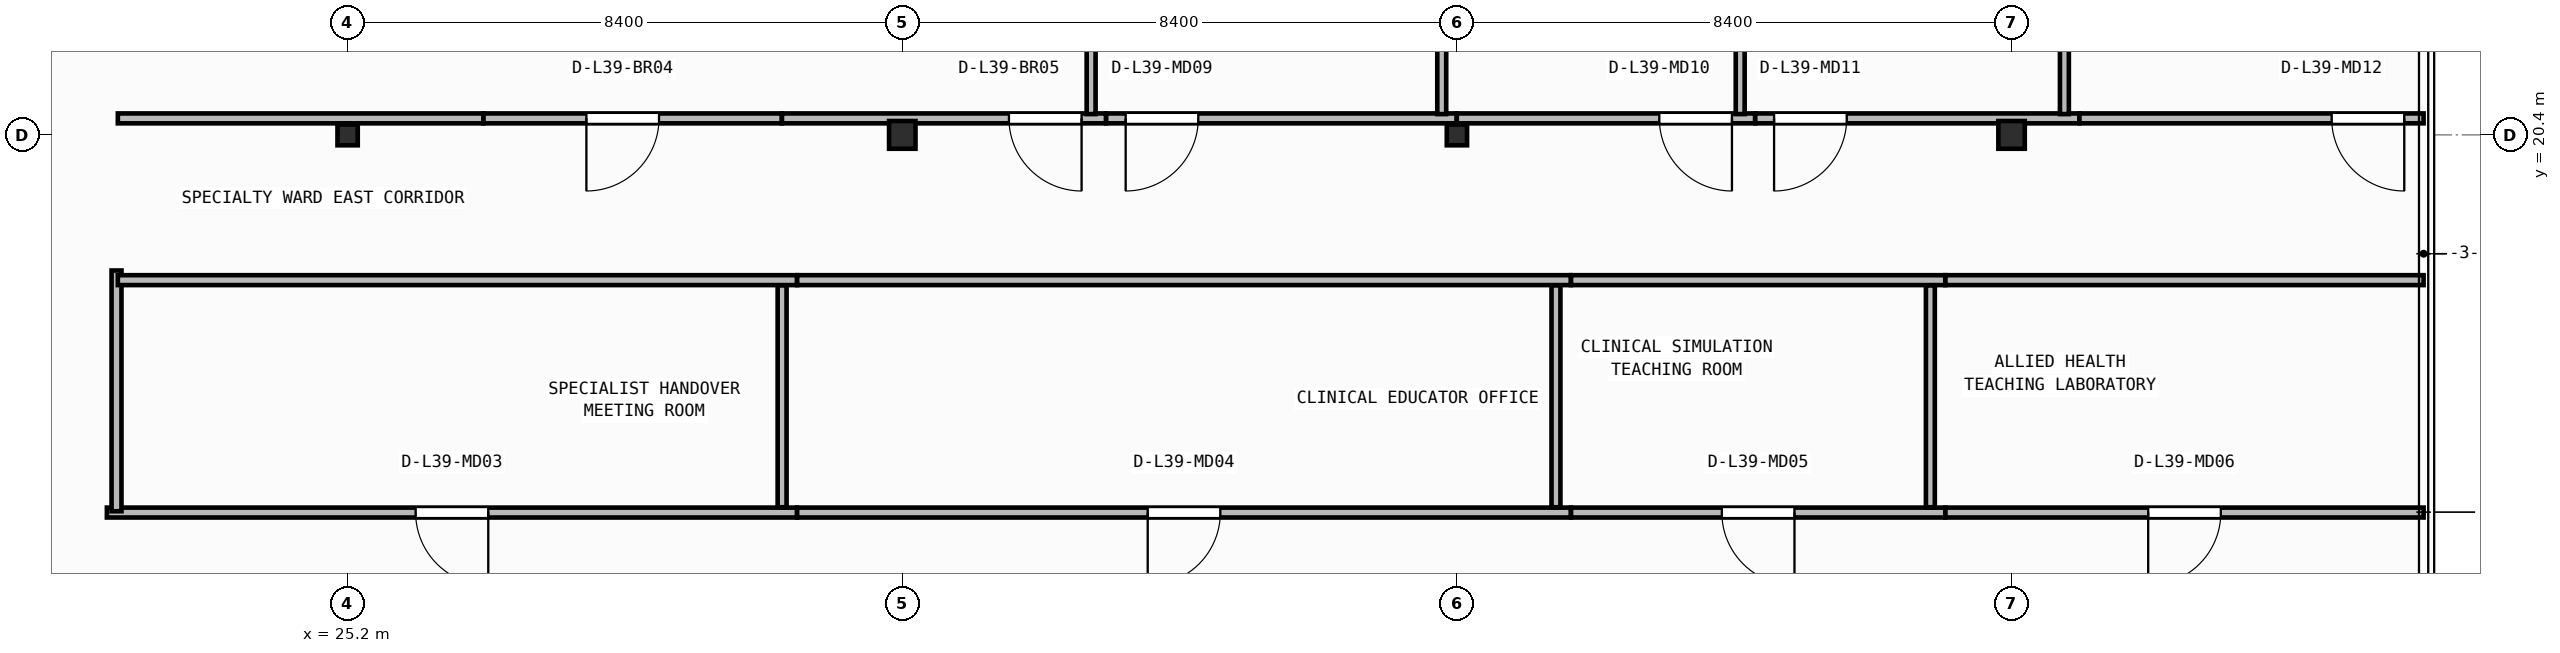
"""IFC4 building model, lengths in metres.
Left out: names, types, materials, properties, quantities, classifications, styles, units other than length and angle.
Written with IfcOpenShell. Run it as: python <this file> out.ifc"""

import sys

from ifc_helpers import new_model, si_unit, direction, frame, frame_2d, origin, origin_2d, place, context, subcontext, project, spatial, rectangle, i_section, extrude, element, fill, save


model = new_model("IFC4")
c1 = context("Model", 3, precision=1e-05, world=origin(), true_north=direction((0.0, 1.0)))
c2 = subcontext(c1, "Body", "Model", "MODEL_VIEW")
j1 = project(units=[si_unit("LENGTHUNIT", "METRE"), si_unit("PLANEANGLEUNIT", "RADIAN")], contexts=[c1])
p1 = place(None, origin())
s1 = spatial("IfcSite", under=j1, at=p1, CompositionType="ELEMENT")
p2 = place(p1, origin())
s2 = spatial("IfcBuilding", under=s1, at=p2, CompositionType="ELEMENT")
p3 = place(p2, frame((0.0, 0.0, 158.65)))
s3 = spatial("IfcBuildingStorey", under=s2, at=p3, CompositionType="ELEMENT", Elevation=158.65)
p4 = place(p3, frame((25.2, 20.4, 0.0), z_axis=(0.0, 0.0, 1.0), x_axis=(1.0, 0.0, 0.0)))
e1 = element("IfcColumn", 1, at=p4, inside=s3, PredefinedType="COLUMN", context=c2, shape_type="SweptSolid", body=[
    extrude(i_section(OverallWidth=0.307, OverallDepth=0.315, WebThickness=0.012, FlangeThickness=0.019, FilletRadius=0.017, at=origin_2d()), origin(), (0.0, 0.0, 1.0), 3.95),
])
p5 = place(p3, frame((33.6, 20.4, 0.0), z_axis=(0.0, 0.0, 1.0), x_axis=(1.0, 0.0, 0.0)))
e2 = element("IfcColumn", 2, at=p5, inside=s3, PredefinedType="COLUMN", context=c2, shape_type="SweptSolid", body=[
    extrude(i_section(OverallWidth=0.4, OverallDepth=0.42, WebThickness=0.025, FlangeThickness=0.04, at=origin_2d()), origin(), (0.0, 0.0, 1.0), 3.95),
])
p6 = place(p3, frame((42.0, 20.4, 0.0), z_axis=(0.0, 0.0, 1.0), x_axis=(1.0, 0.0, 0.0)))
e3 = element("IfcColumn", 3, at=p6, inside=s3, PredefinedType="COLUMN", context=c2, shape_type="SweptSolid", body=[
    extrude(i_section(OverallWidth=0.307, OverallDepth=0.315, WebThickness=0.012, FlangeThickness=0.019, FilletRadius=0.017, at=origin_2d()), origin(), (0.0, 0.0, 1.0), 3.95),
])
p7 = place(p3, frame((50.4, 20.4, 0.0), z_axis=(0.0, 0.0, 1.0), x_axis=(1.0, 0.0, 0.0)))
e4 = element("IfcColumn", 4, at=p7, inside=s3, PredefinedType="COLUMN", context=c2, shape_type="SweptSolid", body=[
    extrude(i_section(OverallWidth=0.4, OverallDepth=0.42, WebThickness=0.025, FlangeThickness=0.04, at=origin_2d()), origin(), (0.0, 0.0, 1.0), 3.95),
])
p8 = place(p3, frame((32.006, 14.68, 0.0), z_axis=(0.0, 0.0, 1.0), x_axis=(-1.0, 0.0, 0.0)))
e5 = element("IfcWall", 5, at=p8, inside=s3, PredefinedType="PARTITIONING", context=c2, shape_type="SweptSolid", body=[
    extrude(rectangle(XDim=10.452, YDim=0.15, at=frame_2d((5.226, 0.0))), origin(), (0.0, 0.0, 1.0), 3.71),
])
p9 = place(p8, frame((4.676, 0.0, 0.0)))
e6 = element("IfcOpeningElement", 6, at=p9, cuts=e5, PredefinedType="OPENING", context=c2, shape_type="SweptSolid", body=[
    extrude(rectangle(XDim=1.1, YDim=2.1, at=frame_2d((0.55, 1.05))), frame((0.0, 0.085, 0.0), z_axis=(0.0, -1.0, 0.0), x_axis=(1.0, 0.0, 0.0)), (0.0, 0.0, 1.0), 0.17),
])
p10 = place(p3, frame((43.726, 14.68, 0.0), z_axis=(0.0, 0.0, 1.0), x_axis=(-1.0, 0.0, 0.0)))
e7 = element("IfcWall", 7, at=p10, inside=s3, PredefinedType="PARTITIONING", context=c2, shape_type="SweptSolid", body=[
    extrude(rectangle(XDim=11.718, YDim=0.15, at=frame_2d((5.859, 0.0))), origin(), (0.0, 0.0, 1.0), 3.71),
])
p11 = place(p10, frame((5.309, 0.0, 0.0)))
e8 = element("IfcOpeningElement", 8, at=p11, cuts=e7, PredefinedType="OPENING", context=c2, shape_type="SweptSolid", body=[
    extrude(rectangle(XDim=1.1, YDim=2.1, at=frame_2d((0.55, 1.05))), frame((0.0, 0.085, 0.0), z_axis=(0.0, -1.0, 0.0), x_axis=(1.0, 0.0, 0.0)), (0.0, 0.0, 1.0), 0.17),
])
p12 = place(p3, frame((49.396, 14.68, 0.0), z_axis=(0.0, 0.0, 1.0), x_axis=(-1.0, 0.0, 0.0)))
e9 = element("IfcWall", 9, at=p12, inside=s3, PredefinedType="PARTITIONING", context=c2, shape_type="SweptSolid", body=[
    extrude(rectangle(XDim=5.668, YDim=0.15, at=frame_2d((2.834, 0.0))), origin(), (0.0, 0.0, 1.0), 3.71),
])
p13 = place(p12, frame((2.284, 0.0, 0.0)))
e10 = element("IfcOpeningElement", 10, at=p13, cuts=e9, PredefinedType="OPENING", context=c2, shape_type="SweptSolid", body=[
    extrude(rectangle(XDim=1.1, YDim=2.1, at=frame_2d((0.55, 1.05))), frame((0.0, 0.085, 0.0), z_axis=(0.0, -1.0, 0.0), x_axis=(1.0, 0.0, 0.0)), (0.0, 0.0, 1.0), 0.17),
])
p14 = place(p3, frame((56.64, 14.68, 0.0), z_axis=(0.0, 0.0, 1.0), x_axis=(-1.0, 0.0, 0.0)))
e11 = element("IfcWall", 11, at=p14, inside=s3, PredefinedType="PARTITIONING", context=c2, shape_type="SweptSolid", body=[
    extrude(rectangle(XDim=7.242, YDim=0.15, at=frame_2d((3.621, 0.0))), origin(), (0.0, 0.0, 1.0), 3.71),
])
p15 = place(p14, frame((3.071, 0.0, 0.0)))
e12 = element("IfcOpeningElement", 12, at=p15, cuts=e11, PredefinedType="OPENING", context=c2, shape_type="SweptSolid", body=[
    extrude(rectangle(XDim=1.1, YDim=2.1, at=frame_2d((0.55, 1.05))), frame((0.0, 0.085, 0.0), z_axis=(0.0, -1.0, 0.0), x_axis=(1.0, 0.0, 0.0)), (0.0, 0.0, 1.0), 0.17),
])
p16 = place(p3, frame((21.7, 14.7, 0.0), z_axis=(0.0, 0.0, 1.0), x_axis=(0.0, 1.0, 0.0)))
e13 = element("IfcWall", 13, at=p16, inside=s3, PredefinedType="PARTITIONING", context=c2, shape_type="SweptSolid", body=[
    extrude(rectangle(XDim=3.646, YDim=0.15, at=frame_2d((1.823, 0.0))), origin(), (0.0, 0.0, 1.0), 3.71),
])
p17 = place(p3, frame((21.72, 18.2, 0.0), z_axis=(0.0, 0.0, 1.0), x_axis=(1.0, 0.0, 0.0)))
e14 = element("IfcWall", 14, at=p17, inside=s3, PredefinedType="PARTITIONING", context=c2, shape_type="SweptSolid", body=[
    extrude(rectangle(XDim=10.286, YDim=0.15, at=frame_2d((5.143, 0.0))), origin(), (0.0, 0.0, 1.0), 3.71),
])
p18 = place(p3, frame((32.008, 18.2, 0.0), z_axis=(0.0, 0.0, 1.0), x_axis=(1.0, 0.0, 0.0)))
e15 = element("IfcWall", 15, at=p18, inside=s3, PredefinedType="PARTITIONING", context=c2, shape_type="SweptSolid", body=[
    extrude(rectangle(XDim=11.718, YDim=0.15, at=frame_2d((5.859, 0.0))), origin(), (0.0, 0.0, 1.0), 3.71),
])
p19 = place(p3, frame((43.728, 18.2, 0.0), z_axis=(0.0, 0.0, 1.0), x_axis=(1.0, 0.0, 0.0)))
e16 = element("IfcWall", 16, at=p19, inside=s3, PredefinedType="PARTITIONING", context=c2, shape_type="SweptSolid", body=[
    extrude(rectangle(XDim=5.668, YDim=0.15, at=frame_2d((2.834, 0.0))), origin(), (0.0, 0.0, 1.0), 3.71),
])
p20 = place(p3, frame((49.398, 18.2, 0.0), z_axis=(0.0, 0.0, 1.0), x_axis=(1.0, 0.0, 0.0)))
e17 = element("IfcWall", 17, at=p20, inside=s3, PredefinedType="PARTITIONING", context=c2, shape_type="SweptSolid", body=[
    extrude(rectangle(XDim=7.242, YDim=0.15, at=frame_2d((3.621, 0.0))), origin(), (0.0, 0.0, 1.0), 3.71),
])
p21 = place(p3, frame((27.256, 20.65, 0.0), z_axis=(0.0, 0.0, 1.0), x_axis=(-1.0, 0.0, 0.0)))
e18 = element("IfcWall", 18, at=p21, inside=s3, PredefinedType="PARTITIONING", context=c2, shape_type="SweptSolid", body=[
    extrude(rectangle(XDim=5.536, YDim=0.15, at=frame_2d((2.768, 0.0))), origin(), (0.0, 0.0, 1.0), 3.083),
])
p22 = place(p3, frame((31.776, 20.65, 0.0), z_axis=(0.0, 0.0, 1.0), x_axis=(-1.0, 0.0, 0.0)))
e19 = element("IfcWall", 19, at=p22, inside=s3, PredefinedType="PARTITIONING", context=c2, shape_type="SweptSolid", body=[
    extrude(rectangle(XDim=4.518, YDim=0.15, at=frame_2d((2.259, 0.0))), origin(), (0.0, 0.0, 1.0), 3.083),
])
p23 = place(p22, frame((1.86, 0.0, 0.0)))
e20 = element("IfcOpeningElement", 20, at=p23, cuts=e19, PredefinedType="OPENING", context=c2, shape_type="SweptSolid", body=[
    extrude(rectangle(XDim=1.1, YDim=2.1, at=frame_2d((0.55, 1.05))), frame((0.0, 0.085, 0.0), z_axis=(0.0, -1.0, 0.0), x_axis=(1.0, 0.0, 0.0)), (0.0, 0.0, 1.0), 0.17),
])
p24 = place(p3, frame((36.686, 20.65, 0.0), z_axis=(0.0, 0.0, 1.0), x_axis=(-1.0, 0.0, 0.0)))
e21 = element("IfcWall", 21, at=p24, inside=s3, PredefinedType="PARTITIONING", context=c2, shape_type="SweptSolid", body=[
    extrude(rectangle(XDim=4.908, YDim=0.15, at=frame_2d((2.454, 0.0))), origin(), (0.0, 0.0, 1.0), 3.083),
])
p25 = place(p24, frame((0.37, 0.0, 0.0)))
e22 = element("IfcOpeningElement", 22, at=p25, cuts=e21, PredefinedType="OPENING", context=c2, shape_type="SweptSolid", body=[
    extrude(rectangle(XDim=1.1, YDim=2.1, at=frame_2d((0.55, 1.05))), frame((0.0, 0.085, 0.0), z_axis=(0.0, -1.0, 0.0), x_axis=(1.0, 0.0, 0.0)), (0.0, 0.0, 1.0), 0.17),
])
p26 = place(p3, frame((41.996, 20.65, 0.0), z_axis=(0.0, 0.0, 1.0), x_axis=(-1.0, 0.0, 0.0)))
e23 = element("IfcWall", 23, at=p26, inside=s3, PredefinedType="PARTITIONING", context=c2, shape_type="SweptSolid", body=[
    extrude(rectangle(XDim=5.308, YDim=0.15, at=frame_2d((2.654, 0.0))), origin(), (0.0, 0.0, 1.0), 3.083),
])
p27 = place(p26, frame((3.913, 0.0, 0.0)))
e24 = element("IfcOpeningElement", 24, at=p27, cuts=e23, PredefinedType="OPENING", context=c2, shape_type="SweptSolid", body=[
    extrude(rectangle(XDim=1.1, YDim=2.1, at=frame_2d((0.55, 1.05))), frame((0.0, 0.085, 0.0), z_axis=(0.0, -1.0, 0.0), x_axis=(1.0, 0.0, 0.0)), (0.0, 0.0, 1.0), 0.17),
])
p28 = place(p3, frame((46.516, 20.65, 0.0), z_axis=(0.0, 0.0, 1.0), x_axis=(-1.0, 0.0, 0.0)))
e25 = element("IfcWall", 25, at=p28, inside=s3, PredefinedType="PARTITIONING", context=c2, shape_type="SweptSolid", body=[
    extrude(rectangle(XDim=4.518, YDim=0.15, at=frame_2d((2.259, 0.0))), origin(), (0.0, 0.0, 1.0), 3.083),
])
p29 = place(p28, frame((0.351, 0.0, 0.0)))
e26 = element("IfcOpeningElement", 26, at=p29, cuts=e25, PredefinedType="OPENING", context=c2, shape_type="SweptSolid", body=[
    extrude(rectangle(XDim=1.1, YDim=2.1, at=frame_2d((0.55, 1.05))), frame((0.0, 0.085, 0.0), z_axis=(0.0, -1.0, 0.0), x_axis=(1.0, 0.0, 0.0)), (0.0, 0.0, 1.0), 0.17),
])
p30 = place(p3, frame((51.426, 20.65, 0.0), z_axis=(0.0, 0.0, 1.0), x_axis=(-1.0, 0.0, 0.0)))
e27 = element("IfcWall", 27, at=p30, inside=s3, PredefinedType="PARTITIONING", context=c2, shape_type="SweptSolid", body=[
    extrude(rectangle(XDim=4.908, YDim=0.15, at=frame_2d((2.454, 0.0))), origin(), (0.0, 0.0, 1.0), 3.083),
])
p31 = place(p30, frame((3.523, 0.0, 0.0)))
e28 = element("IfcOpeningElement", 28, at=p31, cuts=e27, PredefinedType="OPENING", context=c2, shape_type="SweptSolid", body=[
    extrude(rectangle(XDim=1.1, YDim=2.1, at=frame_2d((0.55, 1.05))), frame((0.0, 0.085, 0.0), z_axis=(0.0, -1.0, 0.0), x_axis=(1.0, 0.0, 0.0)), (0.0, 0.0, 1.0), 0.17),
])
p32 = place(p3, frame((56.64, 20.65, 0.0), z_axis=(0.0, 0.0, 1.0), x_axis=(-1.0, 0.0, 0.0)))
e29 = element("IfcWall", 29, at=p32, inside=s3, PredefinedType="PARTITIONING", context=c2, shape_type="SweptSolid", body=[
    extrude(rectangle(XDim=5.212, YDim=0.15, at=frame_2d((2.606, 0.0))), origin(), (0.0, 0.0, 1.0), 3.71),
])
p33 = place(p32, frame((0.293, 0.0, 0.0)))
e30 = element("IfcOpeningElement", 30, at=p33, cuts=e29, PredefinedType="OPENING", context=c2, shape_type="SweptSolid", body=[
    extrude(rectangle(XDim=1.1, YDim=2.1, at=frame_2d((0.55, 1.05))), frame((0.0, 0.085, 0.0), z_axis=(0.0, -1.0, 0.0), x_axis=(1.0, 0.0, 0.0)), (0.0, 0.0, 1.0), 0.17),
])
for number, where, z_axis, x_axis in (
    (31, (31.78, 14.76, 0.0), (0.0, 0.0, 1.0), (0.0, 1.0, 0.0)),
    (32, (43.5, 14.76, 0.0), (0.0, 0.0, 1.0), (0.0, 1.0, 0.0)),
    (33, (49.17, 14.76, 0.0), (0.0, 0.0, 1.0), (0.0, 1.0, 0.0)),
):
    element("IfcWall", number, at=place(p3, frame(where, z_axis=z_axis, x_axis=x_axis)), inside=s3, PredefinedType="PARTITIONING", context=c2, shape_type="SweptSolid", body=[
        extrude(rectangle(XDim=3.36, YDim=0.135, at=frame_2d((1.68, 0.0))), origin(), (0.0, 0.0, 1.0), 3.71),
    ])
p34 = place(p3, frame((36.46, 20.715, 0.0), z_axis=(0.0, 0.0, 1.0), x_axis=(0.0, 1.0, 0.0)))
e34 = element("IfcWall", 34, at=p34, inside=s3, PredefinedType="PARTITIONING", context=c2, shape_type="SweptSolid", body=[
    extrude(rectangle(XDim=6.385, YDim=0.135, at=frame_2d((3.192, 0.0))), origin(), (0.0, 0.0, 1.0), 3.71),
])
p35 = place(p3, frame((41.77, 20.715, 0.0), z_axis=(0.0, 0.0, 1.0), x_axis=(0.0, 1.0, 0.0)))
e35 = element("IfcWall", 35, at=p35, inside=s3, PredefinedType="PARTITIONING", context=c2, shape_type="SweptSolid", body=[
    extrude(rectangle(XDim=6.385, YDim=0.135, at=frame_2d((3.192, 0.0))), origin(), (0.0, 0.0, 1.0), 3.152),
])
for number, where, z_axis, x_axis in (
    (36, (46.29, 20.715, 0.0), (0.0, 0.0, 1.0), (0.0, 1.0, 0.0)),
    (37, (51.2, 20.715, 0.0), (0.0, 0.0, 1.0), (0.0, 1.0, 0.0)),
):
    element("IfcWall", number, at=place(p3, frame(where, z_axis=z_axis, x_axis=x_axis)), inside=s3, PredefinedType="PARTITIONING", context=c2, shape_type="SweptSolid", body=[
        extrude(rectangle(XDim=6.385, YDim=0.135, at=frame_2d((3.192, 0.0))), origin(), (0.0, 0.0, 1.0), 3.71),
    ])
p36 = place(p9, origin())
e38 = element("IfcDoor", 38, at=p36, inside=s3, OperationType="SINGLE_SWING_LEFT", PredefinedType="DOOR", context=c2, shape_type="SweptSolid", body=[
    extrude(rectangle(XDim=1.1, YDim=2.1, at=frame_2d((0.55, 1.05))), frame((0.0, 0.025, 0.0), z_axis=(0.0, -1.0, 0.0), x_axis=(1.0, 0.0, 0.0)), (0.0, 0.0, 1.0), 0.05),
])
fill(e6, e38)
p37 = place(p11, origin())
e39 = element("IfcDoor", 39, at=p37, inside=s3, OperationType="SINGLE_SWING_RIGHT", PredefinedType="DOOR", context=c2, shape_type="SweptSolid", body=[
    extrude(rectangle(XDim=1.1, YDim=2.1, at=frame_2d((0.55, 1.05))), frame((0.0, 0.025, 0.0), z_axis=(0.0, -1.0, 0.0), x_axis=(1.0, 0.0, 0.0)), (0.0, 0.0, 1.0), 0.05),
])
fill(e8, e39)
p38 = place(p13, origin())
e40 = element("IfcDoor", 40, at=p38, inside=s3, OperationType="SINGLE_SWING_LEFT", PredefinedType="DOOR", context=c2, shape_type="SweptSolid", body=[
    extrude(rectangle(XDim=1.1, YDim=2.1, at=frame_2d((0.55, 1.05))), frame((0.0, 0.025, 0.0), z_axis=(0.0, -1.0, 0.0), x_axis=(1.0, 0.0, 0.0)), (0.0, 0.0, 1.0), 0.05),
])
fill(e10, e40)
p39 = place(p15, origin())
e41 = element("IfcDoor", 41, at=p39, inside=s3, OperationType="SINGLE_SWING_RIGHT", PredefinedType="DOOR", context=c2, shape_type="SweptSolid", body=[
    extrude(rectangle(XDim=1.1, YDim=2.1, at=frame_2d((0.55, 1.05))), frame((0.0, 0.025, 0.0), z_axis=(0.0, -1.0, 0.0), x_axis=(1.0, 0.0, 0.0)), (0.0, 0.0, 1.0), 0.05),
])
fill(e12, e41)
p40 = place(p23, origin())
e42 = element("IfcDoor", 42, at=p40, inside=s3, OperationType="SINGLE_SWING_RIGHT", PredefinedType="DOOR", context=c2, shape_type="SweptSolid", body=[
    extrude(rectangle(XDim=1.1, YDim=2.1, at=frame_2d((0.55, 1.05))), frame((0.0, 0.025, 0.0), z_axis=(0.0, -1.0, 0.0), x_axis=(1.0, 0.0, 0.0)), (0.0, 0.0, 1.0), 0.05),
])
fill(e20, e42)
p41 = place(p25, origin())
e43 = element("IfcDoor", 43, at=p41, inside=s3, OperationType="SINGLE_SWING_LEFT", PredefinedType="DOOR", context=c2, shape_type="SweptSolid", body=[
    extrude(rectangle(XDim=1.1, YDim=2.1, at=frame_2d((0.55, 1.05))), frame((0.0, 0.025, 0.0), z_axis=(0.0, -1.0, 0.0), x_axis=(1.0, 0.0, 0.0)), (0.0, 0.0, 1.0), 0.05),
])
fill(e22, e43)
p42 = place(p27, origin())
e44 = element("IfcDoor", 44, at=p42, inside=s3, OperationType="SINGLE_SWING_RIGHT", PredefinedType="DOOR", context=c2, shape_type="SweptSolid", body=[
    extrude(rectangle(XDim=1.1, YDim=2.1, at=frame_2d((0.55, 1.05))), frame((0.0, 0.025, 0.0), z_axis=(0.0, -1.0, 0.0), x_axis=(1.0, 0.0, 0.0)), (0.0, 0.0, 1.0), 0.05),
])
fill(e24, e44)
p43 = place(p29, origin())
e45 = element("IfcDoor", 45, at=p43, inside=s3, OperationType="SINGLE_SWING_LEFT", PredefinedType="DOOR", context=c2, shape_type="SweptSolid", body=[
    extrude(rectangle(XDim=1.1, YDim=2.1, at=frame_2d((0.55, 1.05))), frame((0.0, 0.025, 0.0), z_axis=(0.0, -1.0, 0.0), x_axis=(1.0, 0.0, 0.0)), (0.0, 0.0, 1.0), 0.05),
])
fill(e26, e45)
p44 = place(p31, origin())
e46 = element("IfcDoor", 46, at=p44, inside=s3, OperationType="SINGLE_SWING_RIGHT", PredefinedType="DOOR", context=c2, shape_type="SweptSolid", body=[
    extrude(rectangle(XDim=1.1, YDim=2.1, at=frame_2d((0.55, 1.05))), frame((0.0, 0.025, 0.0), z_axis=(0.0, -1.0, 0.0), x_axis=(1.0, 0.0, 0.0)), (0.0, 0.0, 1.0), 0.05),
])
fill(e28, e46)
p45 = place(p33, origin())
e47 = element("IfcDoor", 47, at=p45, inside=s3, OperationType="SINGLE_SWING_LEFT", PredefinedType="DOOR", context=c2, shape_type="SweptSolid", body=[
    extrude(rectangle(XDim=1.1, YDim=2.1, at=frame_2d((0.55, 1.05))), frame((0.0, 0.025, 0.0), z_axis=(0.0, -1.0, 0.0), x_axis=(1.0, 0.0, 0.0)), (0.0, 0.0, 1.0), 0.05),
])
fill(e30, e47)
save(model, sys.argv[1])
